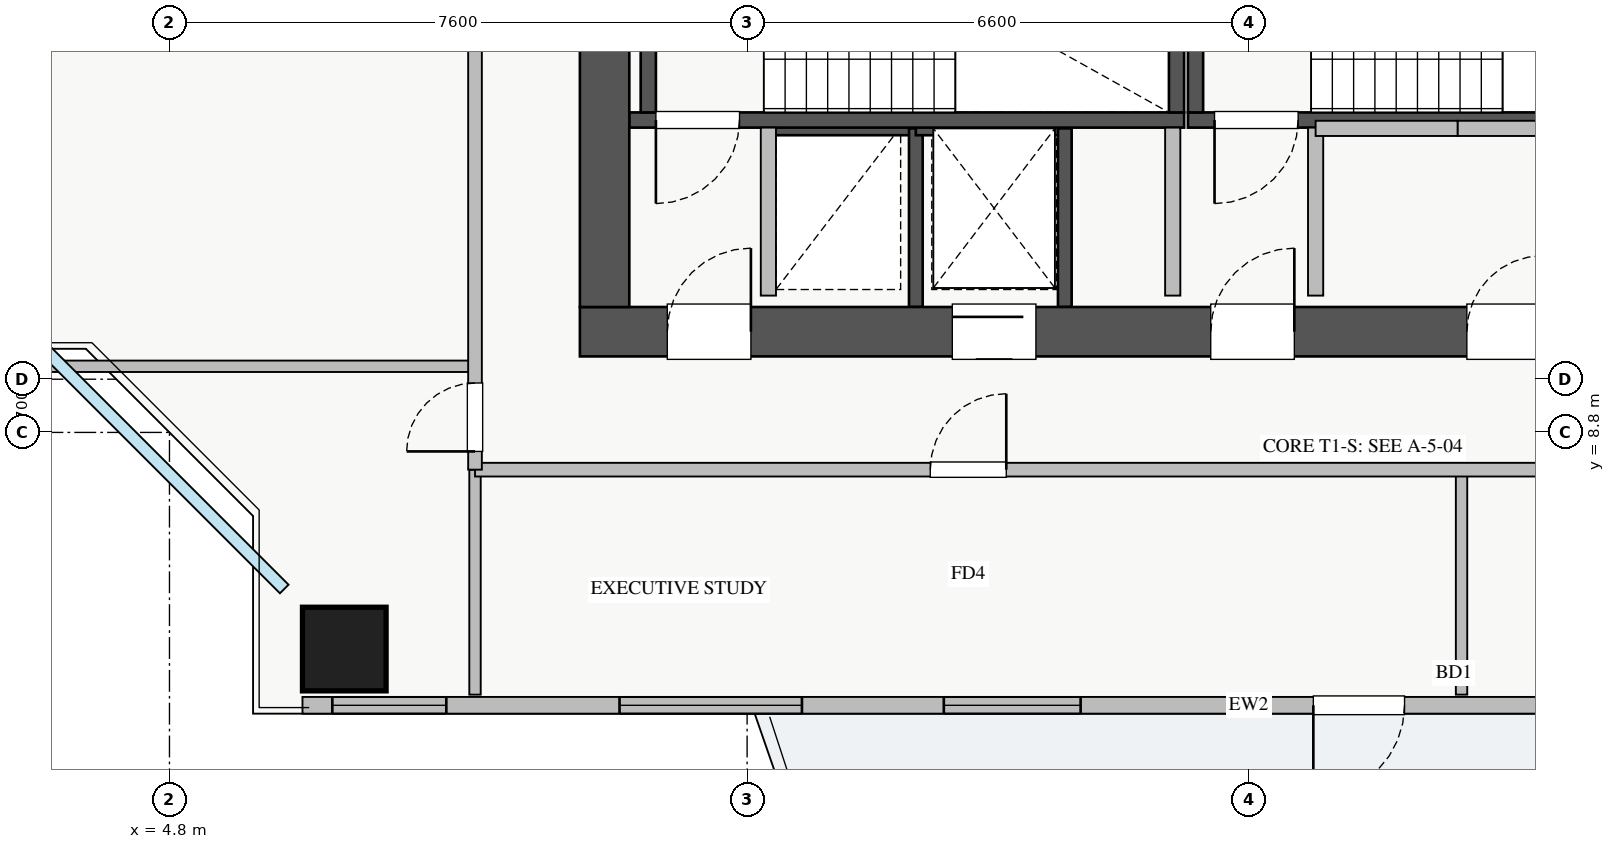
"""IFC4 building model, lengths in metres.
Left out: names, types, materials, properties, quantities, classifications, styles, units other than length and angle.
Written with IfcOpenShell. Run it as: python <this file> out.ifc"""

import sys

from ifc_helpers import new_model, si_unit, direction, frame, frame_2d, origin, origin_2d, place, context, subcontext, project, spatial, rectangle, extrude, source, transform, mapped, element, fill, save


model = new_model("IFC4")
c1 = context("Model", 3, precision=1e-05, world=origin(), true_north=direction((0.0, 1.0)))
c2 = subcontext(c1, "Body", "Model", "MODEL_VIEW")
j1 = project(units=[si_unit("LENGTHUNIT", "METRE"), si_unit("PLANEANGLEUNIT", "RADIAN")], contexts=[c1])
p1 = place(None, origin())
s1 = spatial("IfcSite", under=j1, at=p1, CompositionType="ELEMENT")
p2 = place(p1, origin())
s2 = spatial("IfcBuilding", under=s1, at=p2, CompositionType="ELEMENT")
p3 = place(p2, frame((0.0, 0.0, 136.0)))
s3 = spatial("IfcBuildingStorey", under=s2, at=p3, CompositionType="ELEMENT", Elevation=136.0)
p4 = place(p3, frame((12.68, 12.8, 0.0), z_axis=(0.0, 0.0, 1.0), x_axis=(1.0, 0.0, 0.0)))
e1 = element("IfcWall", 1, at=p4, inside=s3, PredefinedType="SHEAR", context=c2, shape_type="SweptSolid", body=[
    extrude(rectangle(XDim=1.94, YDim=0.18, at=frame_2d((0.97, 0.0))), origin(), (0.0, 0.0, 1.0), 3.03),
])
p5 = place(p3, frame((14.62, 10.45, 0.0), z_axis=(0.0, 0.0, 1.0), x_axis=(0.0, 1.0, 0.0)))
e2 = element("IfcWall", 2, at=p5, inside=s3, PredefinedType="SHEAR", context=c2, shape_type="SweptSolid", body=[
    extrude(rectangle(XDim=2.35, YDim=0.18, at=frame_2d((1.175, 0.0))), origin(), (0.0, 0.0, 1.0), 3.03),
])
p6 = place(p3, frame((14.62, 12.8, 0.0), z_axis=(0.0, 0.0, 1.0), x_axis=(1.0, 0.0, 0.0)))
e3 = element("IfcWall", 3, at=p6, inside=s3, PredefinedType="SHEAR", context=c2, shape_type="SweptSolid", body=[
    extrude(rectangle(XDim=1.96, YDim=0.18, at=frame_2d((0.98, 0.0))), origin(), (0.0, 0.0, 1.0), 3.03),
])
p7 = place(p3, frame((16.58, 10.45, 0.0), z_axis=(0.0, 0.0, 1.0), x_axis=(0.0, 1.0, 0.0)))
e4 = element("IfcWall", 4, at=p7, inside=s3, PredefinedType="SHEAR", context=c2, shape_type="SweptSolid", body=[
    extrude(rectangle(XDim=2.35, YDim=0.18, at=frame_2d((1.175, 0.0))), origin(), (0.0, 0.0, 1.0), 3.03),
])
p8 = place(p3, frame((10.85, 12.91, 0.0), z_axis=(0.0, 0.0, 1.0), x_axis=(1.0, 0.0, 0.0)))
e5 = element("IfcWall", 5, at=p8, inside=s3, PredefinedType="SHEAR", context=c2, shape_type="SweptSolid", body=[
    extrude(rectangle(XDim=7.3, YDim=0.2, at=frame_2d((3.65, 0.0))), origin(), (0.0, 0.0, 1.0), 3.25),
])
p9 = place(p8, frame((0.35, 0.0, 0.0)))
e6 = element("IfcOpeningElement", 6, at=p9, cuts=e5, PredefinedType="OPENING", context=c2, shape_type="SweptSolid", body=[
    extrude(rectangle(XDim=1.1, YDim=2.05, at=frame_2d((0.55, 1.025))), frame((0.0, 0.11, 0.0), z_axis=(0.0, -1.0, 0.0), x_axis=(1.0, 0.0, 0.0)), (0.0, 0.0, 1.0), 0.22),
])
for number, where, z_axis, x_axis in (
    (7, (11.1, 13.01, 0.0), (0.0, 0.0, 1.0), (0.0, 1.0, 0.0)),
    (8, (18.05, 13.01, 0.0), (0.0, 0.0, 1.0), (0.0, 1.0, 0.0)),
):
    element("IfcWall", number, at=place(p3, frame(where, z_axis=z_axis, x_axis=x_axis)), inside=s3, PredefinedType="SHEAR", context=c2, shape_type="SweptSolid", body=[
        extrude(rectangle(XDim=2.94, YDim=0.2, at=frame_2d((1.47, 0.0))), origin(), (0.0, 0.0, 1.0), 3.25),
    ])
p10 = place(p3, frame((18.2, 12.91, 0.0), z_axis=(0.0, 0.0, 1.0), x_axis=(1.0, 0.0, 0.0)))
e9 = element("IfcWall", 9, at=p10, inside=s3, PredefinedType="SHEAR", context=c2, shape_type="SweptSolid", body=[
    extrude(rectangle(XDim=7.15, YDim=0.2, at=frame_2d((3.575, 0.0))), origin(), (0.0, 0.0, 1.0), 3.25),
])
p11 = place(p10, frame((0.35, 0.0, 0.0)))
e10 = element("IfcOpeningElement", 10, at=p11, cuts=e9, PredefinedType="OPENING", context=c2, shape_type="SweptSolid", body=[
    extrude(rectangle(XDim=1.1, YDim=2.05, at=frame_2d((0.55, 1.025))), frame((0.0, 0.11, 0.0), z_axis=(0.0, -1.0, 0.0), x_axis=(1.0, 0.0, 0.0)), (0.0, 0.0, 1.0), 0.22),
])
p12 = place(p3, frame((18.3, 13.01, 0.0), z_axis=(0.0, 0.0, 1.0), x_axis=(0.0, 1.0, 0.0)))
e11 = element("IfcWall", 11, at=p12, inside=s3, PredefinedType="SHEAR", context=c2, shape_type="SweptSolid", body=[
    extrude(rectangle(XDim=2.94, YDim=0.2, at=frame_2d((1.47, 0.0))), origin(), (0.0, 0.0, 1.0), 3.25),
])
p13 = place(p3, frame((10.2, 10.125, 0.0), z_axis=(0.0, 0.0, 1.0), x_axis=(1.0, 0.0, 0.0)))
e12 = element("IfcWall", 12, at=p13, inside=s3, PredefinedType="SHEAR", context=c2, shape_type="SweptSolid", body=[
    extrude(rectangle(XDim=17.6, YDim=0.65, at=frame_2d((8.8, 0.0))), origin(), (0.0, 0.0, 1.0), 3.25),
])
p14 = place(p13, frame((1.15, 0.0, 0.0)))
e13 = element("IfcOpeningElement", 13, at=p14, cuts=e12, PredefinedType="OPENING", context=c2, shape_type="SweptSolid", body=[
    extrude(rectangle(XDim=1.1, YDim=2.05, at=frame_2d((0.55, 1.025))), frame((0.0, 0.335, 0.0), z_axis=(0.0, -1.0, 0.0), x_axis=(1.0, 0.0, 0.0)), (0.0, 0.0, 1.0), 0.67),
])
p15 = place(p13, frame((8.3, 0.0, 0.0)))
e14 = element("IfcOpeningElement", 14, at=p15, cuts=e12, PredefinedType="OPENING", context=c2, shape_type="SweptSolid", body=[
    extrude(rectangle(XDim=1.1, YDim=2.05, at=frame_2d((0.55, 1.025))), frame((0.0, 0.335, 0.0), z_axis=(0.0, -1.0, 0.0), x_axis=(1.0, 0.0, 0.0)), (0.0, 0.0, 1.0), 0.67),
])
p16 = place(p13, frame((4.9, 0.0, 0.0)))
e15 = element("IfcOpeningElement", 15, at=p16, cuts=e12, PredefinedType="OPENING", context=c2, shape_type="SweptSolid", body=[
    extrude(rectangle(XDim=1.1, YDim=2.05, at=frame_2d((0.55, 1.025))), frame((0.0, 0.335, 0.0), z_axis=(0.0, -1.0, 0.0), x_axis=(1.0, 0.0, 0.0)), (0.0, 0.0, 1.0), 0.67),
])
p17 = place(p13, frame((14.74, 0.0, 0.0)))
e16 = element("IfcOpeningElement", 16, at=p17, cuts=e12, PredefinedType="OPENING", context=c2, shape_type="SweptSolid", body=[
    extrude(rectangle(XDim=1.0, YDim=2.05, at=frame_2d((0.5, 1.025))), frame((0.0, 0.335, 0.0), z_axis=(0.0, -1.0, 0.0), x_axis=(1.0, 0.0, 0.0)), (0.0, 0.0, 1.0), 0.67),
])
p18 = place(p13, frame((11.67, 0.0, 0.0)))
e17 = element("IfcOpeningElement", 17, at=p18, cuts=e12, PredefinedType="OPENING", context=c2, shape_type="SweptSolid", body=[
    extrude(rectangle(XDim=1.0, YDim=2.05, at=frame_2d((0.5, 1.025))), frame((0.0, 0.335, 0.0), z_axis=(0.0, -1.0, 0.0), x_axis=(1.0, 0.0, 0.0)), (0.0, 0.0, 1.0), 0.67),
])
p19 = place(p3, frame((10.525, 10.45, 0.0), z_axis=(0.0, 0.0, 1.0), x_axis=(0.0, 1.0, 0.0)))
e18 = element("IfcWall", 18, at=p19, inside=s3, PredefinedType="SHEAR", context=c2, shape_type="SweptSolid", body=[
    extrude(rectangle(XDim=5.9, YDim=0.65, at=frame_2d((2.95, 0.0))), origin(), (0.0, 0.0, 1.0), 3.25),
])
m1 = source(origin(), c2, "Body", "SweptSolid", [
    extrude(rectangle(XDim=1.1, YDim=1.1, at=origin_2d()), origin(), (0.0, 0.0, 1.0), 3.25),
])
p20 = place(p3, frame((7.1, 5.95, 0.0), z_axis=(0.0, 0.0, 1.0), x_axis=(1.0, 0.0, 0.0)))
e19 = element("IfcColumn", 19, at=p20, inside=s3, PredefinedType="COLUMN", context=c2, shape_type="MappedRepresentation", body=[
    mapped(m1, transform((0.0, 0.0, 0.0), x_axis=(1.0, 0.0, 0.0), y_axis=(0.0, 1.0, 0.0), z_axis=(0.0, 0.0, 1.0), scale=1.0)),
])
p21 = place(p3, frame((6.55, 5.21, 0.0), z_axis=(0.0, 0.0, 1.0), x_axis=(1.0, 0.0, 0.0)))
e20 = element("IfcWall", 20, at=p21, inside=s3, PredefinedType="STANDARD", context=c2, shape_type="SweptSolid", body=[
    extrude(rectangle(XDim=24.9, YDim=0.22, at=frame_2d((12.45, 0.0))), origin(), (0.0, 0.0, 1.0), 2.57),
])
p22 = place(p21, frame((13.3, 0.0, 0.0)))
e21 = element("IfcOpeningElement", 21, at=p22, cuts=e20, PredefinedType="OPENING", context=c2, shape_type="SweptSolid", body=[
    extrude(rectangle(XDim=1.2, YDim=2.1, at=frame_2d((0.6, 1.05))), frame((0.0, 0.12, 0.0), z_axis=(0.0, -1.0, 0.0), x_axis=(1.0, 0.0, 0.0)), (0.0, 0.0, 1.0), 0.24),
])
p23 = place(p21, frame((0.393, 0.0, 0.9)))
e22 = element("IfcOpeningElement", 22, at=p23, cuts=e20, PredefinedType="OPENING", context=c2, shape_type="SweptSolid", body=[
    extrude(rectangle(XDim=1.5, YDim=1.5, at=frame_2d((0.75, 0.75))), frame((0.0, 0.12, 0.0), z_axis=(0.0, -1.0, 0.0), x_axis=(1.0, 0.0, 0.0)), (0.0, 0.0, 1.0), 0.24),
])
p24 = place(p21, frame((8.438, 0.0, 0.9)))
e23 = element("IfcOpeningElement", 23, at=p24, cuts=e20, PredefinedType="OPENING", context=c2, shape_type="SweptSolid", body=[
    extrude(rectangle(XDim=1.8, YDim=1.45, at=frame_2d((0.9, 0.725))), frame((0.0, 0.12, 0.0), z_axis=(0.0, -1.0, 0.0), x_axis=(1.0, 0.0, 0.0)), (0.0, 0.0, 1.0), 0.24),
])
p25 = place(p21, frame((17.261, 0.0, 0.9)))
e24 = element("IfcOpeningElement", 24, at=p25, cuts=e20, PredefinedType="OPENING", context=c2, shape_type="SweptSolid", body=[
    extrude(rectangle(XDim=1.5, YDim=1.5, at=frame_2d((0.75, 0.75))), frame((0.0, 0.12, 0.0), z_axis=(0.0, -1.0, 0.0), x_axis=(1.0, 0.0, 0.0)), (0.0, 0.0, 1.0), 0.24),
])
p26 = place(p21, frame((20.738, 0.0, 0.9)))
e25 = element("IfcOpeningElement", 25, at=p26, cuts=e20, PredefinedType="OPENING", context=c2, shape_type="SweptSolid", body=[
    extrude(rectangle(XDim=2.1, YDim=1.48, at=frame_2d((1.05, 0.74))), frame((0.0, 0.12, 0.0), z_axis=(0.0, -1.0, 0.0), x_axis=(1.0, 0.0, 0.0)), (0.0, 0.0, 1.0), 0.24),
])
p27 = place(p21, frame((4.171, 0.0, 0.9)))
e26 = element("IfcOpeningElement", 26, at=p27, cuts=e20, PredefinedType="OPENING", context=c2, shape_type="SweptSolid", body=[
    extrude(rectangle(XDim=2.4, YDim=1.5, at=frame_2d((1.2, 0.75))), frame((0.0, 0.12, 0.0), z_axis=(0.0, -1.0, 0.0), x_axis=(1.0, 0.0, 0.0)), (0.0, 0.0, 1.0), 0.24),
])
for number, where, z_axis, x_axis in (
    (27, (12.68, 10.6, 0.0), (0.0, 0.0, 1.0), (0.0, 1.0, 0.0)),
    (28, (18.0, 10.6, 0.0), (0.0, 0.0, 1.0), (0.0, 1.0, 0.0)),
    (29, (19.88, 10.6, 0.0), (0.0, 0.0, 1.0), (0.0, 1.0, 0.0)),
):
    element("IfcWall", number, at=place(p3, frame(where, z_axis=z_axis, x_axis=x_axis)), inside=s3, PredefinedType="PARTITIONING", context=c2, shape_type="SweptSolid", body=[
        extrude(rectangle(XDim=2.21, YDim=0.2, at=frame_2d((1.105, 0.0))), origin(), (0.0, 0.0, 1.0), 3.03),
    ])
p28 = place(p3, frame((19.88, 12.8, 0.0), z_axis=(0.0, 0.0, 1.0), x_axis=(1.0, 0.0, 0.0)))
e30 = element("IfcWall", 30, at=p28, inside=s3, PredefinedType="PARTITIONING", context=c2, shape_type="SweptSolid", body=[
    extrude(rectangle(XDim=1.87, YDim=0.2, at=frame_2d((0.935, 0.0))), origin(), (0.0, 0.0, 1.0), 3.03),
])
p29 = place(p3, frame((21.75, 12.8, 0.0), z_axis=(0.0, 0.0, 1.0), x_axis=(1.0, 0.0, 0.0)))
e31 = element("IfcWall", 31, at=p29, inside=s3, PredefinedType="PARTITIONING", context=c2, shape_type="SweptSolid", body=[
    extrude(rectangle(XDim=5.17, YDim=0.2, at=frame_2d((2.585, 0.0))), origin(), (0.0, 0.0, 1.0), 3.03),
])
for number, where, z_axis, x_axis in (
    (32, (21.8, 5.35, 0.0), (0.0, 0.0, 1.0), (0.0, 1.0, 0.0)),
    (33, (8.82, 5.35, 0.0), (0.0, 0.0, 1.0), (0.0, 1.0, 0.0)),
):
    element("IfcWall", number, at=place(p3, frame(where, z_axis=z_axis, x_axis=x_axis)), inside=s3, PredefinedType="PARTITIONING", context=c2, shape_type="SweptSolid", body=[
        extrude(rectangle(XDim=2.96, YDim=0.15, at=frame_2d((1.48, 0.0))), origin(), (0.0, 0.0, 1.0), 3.03),
    ])
p30 = place(p3, frame((8.82, 8.31, 0.0), z_axis=(0.0, 0.0, 1.0), x_axis=(1.0, 0.0, 0.0)))
e34 = element("IfcWall", 34, at=p30, inside=s3, PredefinedType="PARTITIONING", context=c2, shape_type="SweptSolid", body=[
    extrude(rectangle(XDim=23.58, YDim=0.18, at=frame_2d((11.79, 0.0))), origin(), (0.0, 0.0, 1.0), 3.03),
])
p31 = place(p30, frame((5.99, 0.0, 0.0)))
e35 = element("IfcOpeningElement", 35, at=p31, cuts=e34, PredefinedType="OPENING", context=c2, shape_type="SweptSolid", body=[
    extrude(rectangle(XDim=1.0, YDim=2.05, at=frame_2d((0.5, 1.025))), frame((0.0, 0.1, 0.0), z_axis=(0.0, -1.0, 0.0), x_axis=(1.0, 0.0, 0.0)), (0.0, 0.0, 1.0), 0.2),
])
p32 = place(p30, frame((17.57, 0.0, 0.0)))
e36 = element("IfcOpeningElement", 36, at=p32, cuts=e34, PredefinedType="OPENING", context=c2, shape_type="SweptSolid", body=[
    extrude(rectangle(XDim=1.0, YDim=2.05, at=frame_2d((0.5, 1.025))), frame((0.0, 0.1, 0.0), z_axis=(0.0, -1.0, 0.0), x_axis=(1.0, 0.0, 0.0)), (0.0, 0.0, 1.0), 0.2),
])
p33 = place(p3, frame((1.35, 9.67, 0.0), z_axis=(0.0, 0.0, 1.0), x_axis=(1.0, 0.0, 0.0)))
e37 = element("IfcWall", 37, at=p33, inside=s3, PredefinedType="PARTITIONING", context=c2, shape_type="SweptSolid", body=[
    extrude(rectangle(XDim=7.47, YDim=0.15, at=frame_2d((3.735, 0.0))), origin(), (0.0, 0.0, 1.0), 3.03),
])
p34 = place(p3, frame((8.82, 8.31, 0.0), z_axis=(0.0, 0.0, 1.0), x_axis=(0.0, 1.0, 0.0)))
e38 = element("IfcWall", 38, at=p34, inside=s3, PredefinedType="PARTITIONING", context=c2, shape_type="SweptSolid", body=[
    extrude(rectangle(XDim=29.13, YDim=0.18, at=frame_2d((14.565, 0.0))), origin(), (0.0, 0.0, 1.0), 3.03),
])
p35 = place(p34, frame((27.94, 0.0, 0.0)))
e39 = element("IfcOpeningElement", 39, at=p35, cuts=e38, PredefinedType="OPENING", context=c2, shape_type="SweptSolid", body=[
    extrude(rectangle(XDim=0.9, YDim=2.05, at=frame_2d((0.45, 1.025))), frame((0.0, 0.1, 0.0), z_axis=(0.0, -1.0, 0.0), x_axis=(1.0, 0.0, 0.0)), (0.0, 0.0, 1.0), 0.2),
])
p36 = place(p34, frame((0.24, 0.0, 0.0)))
e40 = element("IfcOpeningElement", 40, at=p36, cuts=e38, PredefinedType="OPENING", context=c2, shape_type="SweptSolid", body=[
    extrude(rectangle(XDim=0.9, YDim=2.05, at=frame_2d((0.45, 1.025))), frame((0.0, 0.1, 0.0), z_axis=(0.0, -1.0, 0.0), x_axis=(1.0, 0.0, 0.0)), (0.0, 0.0, 1.0), 0.2),
])
p37 = place(p34, frame((7.105, 0.0, 0.0)))
e41 = element("IfcOpeningElement", 41, at=p37, cuts=e38, PredefinedType="OPENING", context=c2, shape_type="SweptSolid", body=[
    extrude(rectangle(XDim=1.0, YDim=2.05, at=frame_2d((0.5, 1.025))), frame((0.0, 0.1, 0.0), z_axis=(0.0, -1.0, 0.0), x_axis=(1.0, 0.0, 0.0)), (0.0, 0.0, 1.0), 0.2),
])
p38 = place(p34, frame((16.475, 0.0, 0.0)))
e42 = element("IfcOpeningElement", 42, at=p38, cuts=e38, PredefinedType="OPENING", context=c2, shape_type="SweptSolid", body=[
    extrude(rectangle(XDim=1.0, YDim=2.05, at=frame_2d((0.5, 1.025))), frame((0.0, 0.1, 0.0), z_axis=(0.0, -1.0, 0.0), x_axis=(1.0, 0.0, 0.0)), (0.0, 0.0, 1.0), 0.2),
])
m2 = source(origin(), c2, "Body", "SweptSolid", [
    extrude(rectangle(XDim=1.2, YDim=2.1, at=frame_2d((0.6, 1.05))), frame((0.0, 0.025, 0.0), z_axis=(0.0, -1.0, 0.0), x_axis=(1.0, 0.0, 0.0)), (0.0, 0.0, 1.0), 0.05),
])
p39 = place(p22, frame((1.2, 0.0, 0.0), z_axis=(0.0, 0.0, 1.0), x_axis=(-1.0, 0.0, 0.0)))
e43 = element("IfcDoor", 43, at=p39, inside=s3, OperationType="SINGLE_SWING_LEFT", PredefinedType="DOOR", context=c2, shape_type="MappedRepresentation", body=[
    mapped(m2, transform((0.0, 0.0, 0.0), x_axis=(1.0, 0.0, 0.0), y_axis=(0.0, 1.0, 0.0), z_axis=(0.0, 0.0, 1.0), scale=1.0)),
])
fill(e21, e43)
m3 = source(origin(), c2, "Body", "SweptSolid", [
    extrude(rectangle(XDim=1.5, YDim=1.5, at=frame_2d((0.75, 0.75))), frame((0.0, 0.03, 0.0), z_axis=(0.0, -1.0, 0.0), x_axis=(1.0, 0.0, 0.0)), (0.0, 0.0, 1.0), 0.06),
])
p40 = place(p23, origin())
e44 = element("IfcWindow", 44, at=p40, inside=s3, PartitioningType="TRIPLE_PANEL_VERTICAL", PredefinedType="WINDOW", context=c2, shape_type="MappedRepresentation", body=[
    mapped(m3, transform((0.0, 0.0, 0.0), x_axis=(1.0, 0.0, 0.0), y_axis=(0.0, 1.0, 0.0), z_axis=(0.0, 0.0, 1.0), scale=1.0)),
])
fill(e22, e44)
m4 = source(origin(), c2, "Body", "SweptSolid", [
    extrude(rectangle(XDim=1.8, YDim=1.45, at=frame_2d((0.9, 0.725))), frame((0.0, 0.03, 0.0), z_axis=(0.0, -1.0, 0.0), x_axis=(1.0, 0.0, 0.0)), (0.0, 0.0, 1.0), 0.06),
])
p41 = place(p24, origin())
e45 = element("IfcWindow", 45, at=p41, inside=s3, PartitioningType="DOUBLE_PANEL_VERTICAL", PredefinedType="WINDOW", context=c2, shape_type="MappedRepresentation", body=[
    mapped(m4, transform((0.0, 0.0, 0.0), x_axis=(1.0, 0.0, 0.0), y_axis=(0.0, 1.0, 0.0), z_axis=(0.0, 0.0, 1.0), scale=1.0)),
])
fill(e23, e45)
m5 = source(origin(), c2, "Body", "SweptSolid", [
    extrude(rectangle(XDim=1.1, YDim=2.05, at=frame_2d((0.55, 1.025))), frame((0.0, 0.025, 0.0), z_axis=(0.0, -1.0, 0.0), x_axis=(1.0, 0.0, 0.0)), (0.0, 0.0, 1.0), 0.05),
])
p42 = place(p14, origin())
e46 = element("IfcDoor", 46, at=p42, inside=s3, OperationType="SINGLE_SWING_RIGHT", PredefinedType="DOOR", context=c2, shape_type="MappedRepresentation", body=[
    mapped(m5, transform((0.0, 0.0, 0.0), x_axis=(1.0, 0.0, 0.0), y_axis=(0.0, 1.0, 0.0), z_axis=(0.0, 0.0, 1.0), scale=1.0)),
])
fill(e13, e46)
p43 = place(p9, frame((1.1, 0.0, 0.0), z_axis=(0.0, 0.0, 1.0), x_axis=(-1.0, 0.0, 0.0)))
e47 = element("IfcDoor", 47, at=p43, inside=s3, OperationType="SINGLE_SWING_LEFT", PredefinedType="DOOR", context=c2, shape_type="MappedRepresentation", body=[
    mapped(m5, transform((0.0, 0.0, 0.0), x_axis=(1.0, 0.0, 0.0), y_axis=(0.0, 1.0, 0.0), z_axis=(0.0, 0.0, 1.0), scale=1.0)),
])
fill(e6, e47)
p44 = place(p15, origin())
e48 = element("IfcDoor", 48, at=p44, inside=s3, OperationType="SINGLE_SWING_RIGHT", PredefinedType="DOOR", context=c2, shape_type="MappedRepresentation", body=[
    mapped(m5, transform((0.0, 0.0, 0.0), x_axis=(1.0, 0.0, 0.0), y_axis=(0.0, 1.0, 0.0), z_axis=(0.0, 0.0, 1.0), scale=1.0)),
])
fill(e14, e48)
p45 = place(p11, frame((1.1, 0.0, 0.0), z_axis=(0.0, 0.0, 1.0), x_axis=(-1.0, 0.0, 0.0)))
e49 = element("IfcDoor", 49, at=p45, inside=s3, OperationType="SINGLE_SWING_LEFT", PredefinedType="DOOR", context=c2, shape_type="MappedRepresentation", body=[
    mapped(m5, transform((0.0, 0.0, 0.0), x_axis=(1.0, 0.0, 0.0), y_axis=(0.0, 1.0, 0.0), z_axis=(0.0, 0.0, 1.0), scale=1.0)),
])
fill(e10, e49)
p46 = place(p16, origin())
e50 = element("IfcDoor", 50, at=p46, inside=s3, OperationType="SLIDING_TO_RIGHT", PredefinedType="DOOR", context=c2, shape_type="MappedRepresentation", body=[
    mapped(m5, transform((0.0, 0.0, 0.0), x_axis=(1.0, 0.0, 0.0), y_axis=(0.0, 1.0, 0.0), z_axis=(0.0, 0.0, 1.0), scale=1.0)),
])
fill(e15, e50)
m6 = source(origin(), c2, "Body", "SweptSolid", [
    extrude(rectangle(XDim=1.0, YDim=2.05, at=frame_2d((0.5, 1.025))), frame((0.0, 0.025, 0.0), z_axis=(0.0, -1.0, 0.0), x_axis=(1.0, 0.0, 0.0)), (0.0, 0.0, 1.0), 0.05),
])
p47 = place(p18, origin())
e51 = element("IfcDoor", 51, at=p47, inside=s3, OperationType="SINGLE_SWING_RIGHT", PredefinedType="DOOR", context=c2, shape_type="MappedRepresentation", body=[
    mapped(m6, transform((0.0, 0.0, 0.0), x_axis=(1.0, 0.0, 0.0), y_axis=(0.0, 1.0, 0.0), z_axis=(0.0, 0.0, 1.0), scale=1.0)),
])
fill(e17, e51)
p48 = place(p31, origin())
e52 = element("IfcDoor", 52, at=p48, inside=s3, OperationType="SINGLE_SWING_RIGHT", PredefinedType="DOOR", context=c2, shape_type="MappedRepresentation", body=[
    mapped(m6, transform((0.0, 0.0, 0.0), x_axis=(1.0, 0.0, 0.0), y_axis=(0.0, 1.0, 0.0), z_axis=(0.0, 0.0, 1.0), scale=1.0)),
])
fill(e35, e52)
m7 = source(origin(), c2, "Body", "SweptSolid", [
    extrude(rectangle(XDim=0.9, YDim=2.05, at=frame_2d((0.45, 1.025))), frame((0.0, 0.025, 0.0), z_axis=(0.0, -1.0, 0.0), x_axis=(1.0, 0.0, 0.0)), (0.0, 0.0, 1.0), 0.05),
])
p49 = place(p36, origin())
e53 = element("IfcDoor", 53, at=p49, inside=s3, OperationType="SINGLE_SWING_LEFT", PredefinedType="DOOR", context=c2, shape_type="MappedRepresentation", body=[
    mapped(m7, transform((0.0, 0.0, 0.0), x_axis=(1.0, 0.0, 0.0), y_axis=(0.0, 1.0, 0.0), z_axis=(0.0, 0.0, 1.0), scale=1.0)),
])
fill(e40, e53)
m8 = source(origin(), c2, "Body", "SweptSolid", [
    extrude(rectangle(XDim=2.4, YDim=1.5, at=frame_2d((1.2, 0.75))), frame((0.0, 0.03, 0.0), z_axis=(0.0, -1.0, 0.0), x_axis=(1.0, 0.0, 0.0)), (0.0, 0.0, 1.0), 0.06),
])
p50 = place(p27, origin())
e54 = element("IfcWindow", 54, at=p50, inside=s3, PartitioningType="TRIPLE_PANEL_VERTICAL", PredefinedType="WINDOW", context=c2, shape_type="MappedRepresentation", body=[
    mapped(m8, transform((0.0, 0.0, 0.0), x_axis=(1.0, 0.0, 0.0), y_axis=(0.0, 1.0, 0.0), z_axis=(0.0, 0.0, 1.0), scale=1.0)),
])
fill(e26, e54)
save(model, sys.argv[1])
